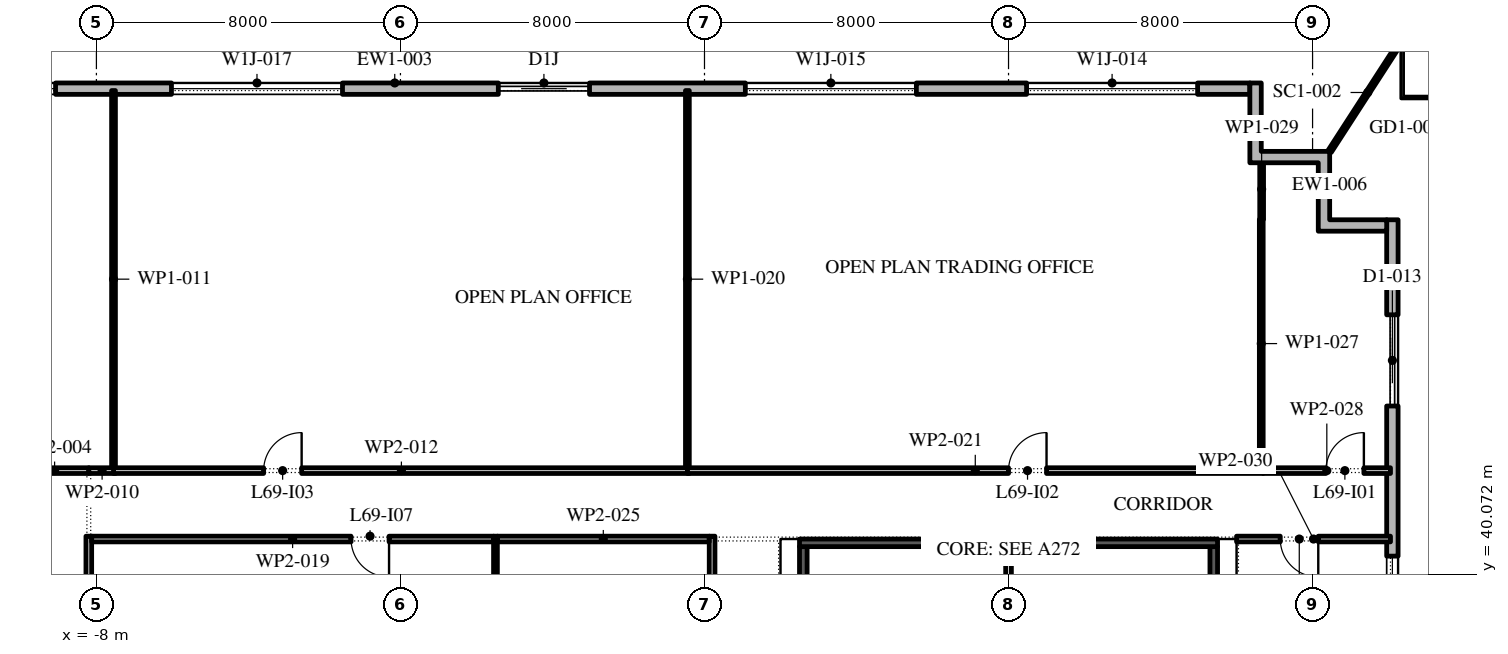
"""IFC4 building model, lengths in metres.
Left out: names, types, materials, properties, quantities, classifications, styles, units other than length and angle.
Written with IfcOpenShell. Run it as: python <this file> out.ifc"""

import sys

from ifc_helpers import new_model, si_unit, direction, frame, frame_2d, origin, place, context, subcontext, project, spatial, polyline, rectangle, outline, extrude, element, fill, save


model = new_model("IFC4")
c1 = context("Model", 3, precision=1e-05, world=origin(), true_north=direction((0.0, 1.0)))
c2 = subcontext(c1, "Body", "Model", "MODEL_VIEW")
j1 = project(units=[si_unit("LENGTHUNIT", "METRE"), si_unit("PLANEANGLEUNIT", "RADIAN")], contexts=[c1])
p1 = place(None, origin())
s1 = spatial("IfcSite", under=j1, at=p1, CompositionType="ELEMENT")
p2 = place(p1, origin())
s2 = spatial("IfcBuilding", under=s1, at=p2, CompositionType="ELEMENT")
p3 = place(p2, frame((0.0, 0.0, 317.4)))
s3 = spatial("IfcBuildingStorey", under=s2, at=p3, CompositionType="ELEMENT", Elevation=317.4)
p4 = place(p3, frame((26.1, -2.1, 0.0), z_axis=(0.0, 0.0, 1.0), x_axis=(0.0, 1.0, 0.0)))
e1 = element("IfcWall", 1, at=p4, inside=s3, PredefinedType="STANDARD", context=c2, shape_type="SweptSolid", body=[
    extrude(rectangle(XDim=51.5, YDim=0.3, at=frame_2d((25.75, 0.0))), origin(), (0.0, 0.0, 1.0), 4.0),
])
p5 = place(p4, frame((1.3, 0.0, 0.45)))
e2 = element("IfcOpeningElement", 2, at=p5, cuts=e1, PredefinedType="OPENING", context=c2, shape_type="SweptSolid", body=[
    extrude(rectangle(XDim=4.5, YDim=3.05, at=frame_2d((2.25, 1.525))), frame((0.0, 0.16, 0.0), z_axis=(0.0, -1.0, 0.0), x_axis=(1.0, 0.0, 0.0)), (0.0, 0.0, 1.0), 0.32),
])
p6 = place(p4, frame((8.55, 0.0, 0.45)))
e3 = element("IfcOpeningElement", 3, at=p6, cuts=e1, PredefinedType="OPENING", context=c2, shape_type="SweptSolid", body=[
    extrude(rectangle(XDim=4.5, YDim=3.05, at=frame_2d((2.25, 1.525))), frame((0.0, 0.16, 0.0), z_axis=(0.0, -1.0, 0.0), x_axis=(1.0, 0.0, 0.0)), (0.0, 0.0, 1.0), 0.32),
])
p7 = place(p4, frame((17.0, 0.0, 0.0)))
e4 = element("IfcOpeningElement", 4, at=p7, cuts=e1, PredefinedType="OPENING", context=c2, shape_type="SweptSolid", body=[
    extrude(rectangle(XDim=2.4, YDim=3.5, at=frame_2d((1.2, 1.75))), frame((0.0, 0.16, 0.0), z_axis=(0.0, -1.0, 0.0), x_axis=(1.0, 0.0, 0.0)), (0.0, 0.0, 1.0), 0.32),
])
p8 = place(p4, frame((23.35, 0.0, 0.45)))
e5 = element("IfcOpeningElement", 5, at=p8, cuts=e1, PredefinedType="OPENING", context=c2, shape_type="SweptSolid", body=[
    extrude(rectangle(XDim=4.5, YDim=3.05, at=frame_2d((2.25, 1.525))), frame((0.0, 0.16, 0.0), z_axis=(0.0, -1.0, 0.0), x_axis=(1.0, 0.0, 0.0)), (0.0, 0.0, 1.0), 0.32),
])
p9 = place(p4, frame((30.75, 0.0, 0.45)))
e6 = element("IfcOpeningElement", 6, at=p9, cuts=e1, PredefinedType="OPENING", context=c2, shape_type="SweptSolid", body=[
    extrude(rectangle(XDim=4.5, YDim=3.05, at=frame_2d((2.25, 1.525))), frame((0.0, 0.16, 0.0), z_axis=(0.0, -1.0, 0.0), x_axis=(1.0, 0.0, 0.0)), (0.0, 0.0, 1.0), 0.32),
])
p10 = place(p4, frame((38.15, 0.0, 0.45)))
e7 = element("IfcOpeningElement", 7, at=p10, cuts=e1, PredefinedType="OPENING", context=c2, shape_type="SweptSolid", body=[
    extrude(rectangle(XDim=4.5, YDim=3.05, at=frame_2d((2.25, 1.525))), frame((0.0, 0.16, 0.0), z_axis=(0.0, -1.0, 0.0), x_axis=(1.0, 0.0, 0.0)), (0.0, 0.0, 1.0), 0.32),
])
p11 = place(p4, frame((46.6, 0.0, 0.0)))
e8 = element("IfcOpeningElement", 8, at=p11, cuts=e1, PredefinedType="OPENING", context=c2, shape_type="SweptSolid", body=[
    extrude(rectangle(XDim=2.4, YDim=3.5, at=frame_2d((1.2, 1.75))), frame((0.0, 0.16, 0.0), z_axis=(0.0, -1.0, 0.0), x_axis=(1.0, 0.0, 0.0)), (0.0, 0.0, 1.0), 0.32),
])
p12 = place(p3, frame((22.35, 52.85, 0.0), z_axis=(0.0, 0.0, 1.0), x_axis=(-1.0, 0.0, 0.0)))
e9 = element("IfcWall", 9, at=p12, inside=s3, PredefinedType="STANDARD", context=c2, shape_type="SweptSolid", body=[
    extrude(rectangle(XDim=45.0, YDim=0.3, at=frame_2d((22.5, 0.0))), origin(), (0.0, 0.0, 1.0), 4.0),
])
p13 = place(p12, frame((1.375, 0.0, 0.45)))
e10 = element("IfcOpeningElement", 10, at=p13, cuts=e9, PredefinedType="OPENING", context=c2, shape_type="SweptSolid", body=[
    extrude(rectangle(XDim=4.5, YDim=2.675, at=frame_2d((2.25, 1.337))), frame((0.0, 0.16, 0.0), z_axis=(0.0, -1.0, 0.0), x_axis=(1.0, 0.0, 0.0)), (0.0, 0.0, 1.0), 0.32),
])
p14 = place(p12, frame((8.775, 0.0, 0.45)))
e11 = element("IfcOpeningElement", 11, at=p14, cuts=e9, PredefinedType="OPENING", context=c2, shape_type="SweptSolid", body=[
    extrude(rectangle(XDim=4.5, YDim=2.675, at=frame_2d((2.25, 1.337))), frame((0.0, 0.16, 0.0), z_axis=(0.0, -1.0, 0.0), x_axis=(1.0, 0.0, 0.0)), (0.0, 0.0, 1.0), 0.32),
])
p15 = place(p12, frame((17.375, 0.0, 0.0)))
e12 = element("IfcOpeningElement", 12, at=p15, cuts=e9, PredefinedType="OPENING", context=c2, shape_type="SweptSolid", body=[
    extrude(rectangle(XDim=2.4, YDim=3.125, at=frame_2d((1.2, 1.562))), frame((0.0, 0.16, 0.0), z_axis=(0.0, -1.0, 0.0), x_axis=(1.0, 0.0, 0.0)), (0.0, 0.0, 1.0), 0.32),
])
p16 = place(p12, frame((23.875, 0.0, 0.45)))
e13 = element("IfcOpeningElement", 13, at=p16, cuts=e9, PredefinedType="OPENING", context=c2, shape_type="SweptSolid", body=[
    extrude(rectangle(XDim=4.5, YDim=2.675, at=frame_2d((2.25, 1.337))), frame((0.0, 0.16, 0.0), z_axis=(0.0, -1.0, 0.0), x_axis=(1.0, 0.0, 0.0)), (0.0, 0.0, 1.0), 0.32),
])
p17 = place(p12, frame((31.425, 0.0, 0.45)))
e14 = element("IfcOpeningElement", 14, at=p17, cuts=e9, PredefinedType="OPENING", context=c2, shape_type="SweptSolid", body=[
    extrude(rectangle(XDim=4.5, YDim=2.675, at=frame_2d((2.25, 1.337))), frame((0.0, 0.16, 0.0), z_axis=(0.0, -1.0, 0.0), x_axis=(1.0, 0.0, 0.0)), (0.0, 0.0, 1.0), 0.32),
])
p18 = place(p12, frame((38.975, 0.0, 0.45)))
e15 = element("IfcOpeningElement", 15, at=p18, cuts=e9, PredefinedType="OPENING", context=c2, shape_type="SweptSolid", body=[
    extrude(rectangle(XDim=4.5, YDim=2.675, at=frame_2d((2.25, 1.337))), frame((0.0, 0.16, 0.0), z_axis=(0.0, -1.0, 0.0), x_axis=(1.0, 0.0, 0.0)), (0.0, 0.0, 1.0), 0.32),
])
p19 = place(p3, origin())
e16 = element("IfcWall", 16, at=p19, inside=s3, PredefinedType="STANDARD", context=c2, shape_type="SweptSolid", body=[
    extrude(outline(polyline([(24.15, 50.9), (22.35, 50.9), (22.35, 53.0), (22.65, 53.0), (22.65, 51.2), (24.45, 51.2), (24.45, 49.4), (25.95, 49.4), (25.95, 49.1), (24.15, 49.1), (24.15, 50.9)])), origin(), (0.0, 0.0, 1.0), 4.0),
])
p20 = place(p3, frame((24.45, 51.2, -0.05), z_axis=(0.0, 0.0, 1.0), x_axis=(0.543275962531, 0.839554184396, 0.0)))
e17 = element("IfcWall", 17, at=p20, inside=s3, PredefinedType="STANDARD", context=c2, shape_type="SweptSolid", body=[
    extrude(rectangle(XDim=3.691, YDim=0.1, at=frame_2d((1.845, 0.0))), origin(), (0.0, 0.0, 1.0), 4.05),
])
p21 = place(p3, frame((21.4, 25.75, 0.0), z_axis=(0.0, 0.0, 1.0), x_axis=(0.0, 1.0, 0.0)))
e18 = element("IfcWall", 18, at=p21, inside=s3, PredefinedType="SHEAR", context=c2, shape_type="SweptSolid", body=[
    extrude(rectangle(XDim=15.05, YDim=0.2, at=frame_2d((7.525, 0.0))), origin(), (0.0, 0.0, 1.0), 4.0),
])
p22 = place(p21, frame((7.075, 0.0, 0.0)))
e19 = element("IfcOpeningElement", 19, at=p22, cuts=e18, PredefinedType="OPENING", context=c2, shape_type="SweptSolid", body=[
    extrude(rectangle(XDim=0.9, YDim=2.1, at=frame_2d((0.45, 1.05))), frame((0.0, 0.11, 0.0), z_axis=(0.0, -1.0, 0.0), x_axis=(1.0, 0.0, 0.0)), (0.0, 0.0, 1.0), 0.22),
])
p23 = place(p3, frame((10.6, 25.75, 0.0), z_axis=(0.0, 0.0, 1.0), x_axis=(0.0, 1.0, 0.0)))
e20 = element("IfcWall", 20, at=p23, inside=s3, PredefinedType="SHEAR", context=c2, shape_type="SweptSolid", body=[
    extrude(rectangle(XDim=15.05, YDim=0.2, at=frame_2d((7.525, 0.0))), origin(), (0.0, 0.0, 1.0), 4.0),
])
p24 = place(p23, frame((3.288, 0.0, 0.0)))
e21 = element("IfcOpeningElement", 21, at=p24, cuts=e20, PredefinedType="OPENING", context=c2, shape_type="SweptSolid", body=[
    extrude(rectangle(XDim=0.9, YDim=2.1, at=frame_2d((0.45, 1.05))), frame((0.0, 0.11, 0.0), z_axis=(0.0, -1.0, 0.0), x_axis=(1.0, 0.0, 0.0)), (0.0, 0.0, 1.0), 0.22),
])
p25 = place(p23, frame((10.887, 0.0, 0.0)))
e22 = element("IfcOpeningElement", 22, at=p25, cuts=e20, PredefinedType="OPENING", context=c2, shape_type="SweptSolid", body=[
    extrude(rectangle(XDim=0.9, YDim=2.1, at=frame_2d((0.45, 1.05))), frame((0.0, 0.11, 0.0), z_axis=(0.0, -1.0, 0.0), x_axis=(1.0, 0.0, 0.0)), (0.0, 0.0, 1.0), 0.22),
])
p26 = place(p3, frame((10.5, 40.9, 0.0), z_axis=(0.0, 0.0, 1.0), x_axis=(1.0, 0.0, 0.0)))
e23 = element("IfcWall", 23, at=p26, inside=s3, PredefinedType="SHEAR", context=c2, shape_type="SweptSolid", body=[
    extrude(rectangle(XDim=11.0, YDim=0.2, at=frame_2d((5.5, 0.0))), origin(), (0.0, 0.0, 1.0), 4.0),
])
p27 = place(p3, frame((16.0, 25.75, 0.0), z_axis=(0.0, 0.0, 1.0), x_axis=(0.0, 1.0, 0.0)))
e24 = element("IfcWall", 24, at=p27, inside=s3, PredefinedType="PARTITIONING", context=c2, shape_type="SweptSolid", body=[
    extrude(rectangle(XDim=15.05, YDim=0.15, at=frame_2d((7.525, 0.0))), origin(), (0.0, 0.0, 1.0), 4.0),
])
p28 = place(p3, frame((-10.0, 42.8, 0.0), z_axis=(0.0, 0.0, 1.0), x_axis=(1.0, 0.0, 0.0)))
e25 = element("IfcWall", 25, at=p28, inside=s3, PredefinedType="PARTITIONING", context=c2, shape_type="SweptSolid", body=[
    extrude(rectangle(XDim=1.8, YDim=0.15, at=frame_2d((0.9, 0.0))), origin(), (0.0, 0.0, 1.0), 4.0),
])
p29 = place(p3, frame((-8.2, 41.075, 0.0), z_axis=(0.0, 0.0, 1.0), x_axis=(0.0, -1.0, 0.0)))
e26 = element("IfcWall", 26, at=p29, inside=s3, PredefinedType="PARTITIONING", context=c2, shape_type="SweptSolid", body=[
    extrude(rectangle(XDim=9.575, YDim=0.15, at=frame_2d((4.788, 0.0))), origin(), (0.0, 0.0, 1.0), 4.0),
])
p30 = place(p3, frame((-8.2, 42.8, 0.0), z_axis=(0.0, 0.0, 1.0), x_axis=(1.0, 0.0, 0.0)))
e27 = element("IfcWall", 27, at=p30, inside=s3, PredefinedType="PARTITIONING", context=c2, shape_type="SweptSolid", body=[
    extrude(rectangle(XDim=0.7, YDim=0.15, at=frame_2d((0.35, 0.0))), origin(), (0.0, 0.0, 1.0), 4.0),
])
p31 = place(p3, frame((-7.55, 42.875, 0.0), z_axis=(0.0, 0.0, 1.0), x_axis=(0.0, 1.0, 0.0)))
e28 = element("IfcWall", 28, at=p31, inside=s3, PredefinedType="PARTITIONING", context=c2, shape_type="SweptSolid", body=[
    extrude(rectangle(XDim=9.925, YDim=0.1, at=frame_2d((4.962, 0.0))), origin(), (0.0, 0.0, 1.0), 4.0),
])
p32 = place(p3, frame((-7.55, 42.8, 0.0), z_axis=(0.0, 0.0, 1.0), x_axis=(1.0, 0.0, 0.0)))
e29 = element("IfcWall", 29, at=p32, inside=s3, PredefinedType="PARTITIONING", context=c2, shape_type="SweptSolid", body=[
    extrude(rectangle(XDim=15.15, YDim=0.15, at=frame_2d((7.575, 0.0))), origin(), (0.0, 0.0, 1.0), 4.0),
])
p33 = place(p32, frame((3.95, 0.0, 0.0)))
e30 = element("IfcOpeningElement", 30, at=p33, cuts=e29, PredefinedType="OPENING", context=c2, shape_type="SweptSolid", body=[
    extrude(rectangle(XDim=1.0, YDim=2.1, at=frame_2d((0.5, 1.05))), frame((0.0, 0.085, 0.0), z_axis=(0.0, -1.0, 0.0), x_axis=(1.0, 0.0, 0.0)), (0.0, 0.0, 1.0), 0.17),
])
p34 = place(p3, frame((2.5, 31.55, 0.0), z_axis=(0.0, 0.0, 1.0), x_axis=(0.0, 1.0, 0.0)))
e31 = element("IfcWall", 31, at=p34, inside=s3, PredefinedType="PARTITIONING", context=c2, shape_type="SweptSolid", body=[
    extrude(rectangle(XDim=9.525, YDim=0.1, at=frame_2d((4.762, 0.0))), origin(), (0.0, 0.0, 1.0), 4.0),
])
p35 = place(p3, frame((2.45, 41.0, 0.0), z_axis=(0.0, 0.0, 1.0), x_axis=(-1.0, 0.0, 0.0)))
e32 = element("IfcWall", 32, at=p35, inside=s3, PredefinedType="PARTITIONING", context=c2, shape_type="SweptSolid", body=[
    extrude(rectangle(XDim=10.575, YDim=0.15, at=frame_2d((5.288, 0.0))), origin(), (0.0, 0.0, 1.0), 4.0),
])
p36 = place(p35, frame((2.75, 0.0, 0.0)))
e33 = element("IfcOpeningElement", 33, at=p36, cuts=e32, PredefinedType="OPENING", context=c2, shape_type="SweptSolid", body=[
    extrude(rectangle(XDim=1.0, YDim=2.1, at=frame_2d((0.5, 1.05))), frame((0.0, 0.085, 0.0), z_axis=(0.0, -1.0, 0.0), x_axis=(1.0, 0.0, 0.0)), (0.0, 0.0, 1.0), 0.17),
])
p37 = place(p3, frame((7.55, 42.875, 0.0), z_axis=(0.0, 0.0, 1.0), x_axis=(0.0, 1.0, 0.0)))
e34 = element("IfcWall", 34, at=p37, inside=s3, PredefinedType="PARTITIONING", context=c2, shape_type="SweptSolid", body=[
    extrude(rectangle(XDim=9.925, YDim=0.1, at=frame_2d((4.962, 0.0))), origin(), (0.0, 0.0, 1.0), 4.0),
])
p38 = place(p3, frame((7.55, 42.8, 0.0), z_axis=(0.0, 0.0, 1.0), x_axis=(1.0, 0.0, 0.0)))
e35 = element("IfcWall", 35, at=p38, inside=s3, PredefinedType="PARTITIONING", context=c2, shape_type="SweptSolid", body=[
    extrude(rectangle(XDim=15.15, YDim=0.15, at=frame_2d((7.575, 0.0))), origin(), (0.0, 0.0, 1.0), 4.0),
])
p39 = place(p38, frame((8.45, 0.0, 0.0)))
e36 = element("IfcOpeningElement", 36, at=p39, cuts=e35, PredefinedType="OPENING", context=c2, shape_type="SweptSolid", body=[
    extrude(rectangle(XDim=1.0, YDim=2.1, at=frame_2d((0.5, 1.05))), frame((0.0, 0.085, 0.0), z_axis=(0.0, -1.0, 0.0), x_axis=(1.0, 0.0, 0.0)), (0.0, 0.0, 1.0), 0.17),
])
p40 = place(p3, frame((8.2, 25.5, 0.0), z_axis=(0.0, 0.0, 1.0), x_axis=(0.0, 1.0, 0.0)))
e37 = element("IfcWall", 37, at=p40, inside=s3, PredefinedType="PARTITIONING", context=c2, shape_type="SweptSolid", body=[
    extrude(rectangle(XDim=15.575, YDim=0.15, at=frame_2d((7.788, 0.0))), origin(), (0.0, 0.0, 1.0), 4.0),
])
p41 = place(p40, frame((4.1, 0.0, 0.0)))
e38 = element("IfcOpeningElement", 38, at=p41, cuts=e37, PredefinedType="OPENING", context=c2, shape_type="SweptSolid", body=[
    extrude(rectangle(XDim=1.0, YDim=2.1, at=frame_2d((0.5, 1.05))), frame((0.0, 0.085, 0.0), z_axis=(0.0, -1.0, 0.0), x_axis=(1.0, 0.0, 0.0)), (0.0, 0.0, 1.0), 0.17),
])
p42 = place(p3, frame((8.125, 41.0, 0.0), z_axis=(0.0, 0.0, 1.0), x_axis=(-1.0, 0.0, 0.0)))
e39 = element("IfcWall", 39, at=p42, inside=s3, PredefinedType="PARTITIONING", context=c2, shape_type="SweptSolid", body=[
    extrude(rectangle(XDim=5.575, YDim=0.15, at=frame_2d((2.788, 0.0))), origin(), (0.0, 0.0, 1.0), 4.0),
])
p43 = place(p3, frame((22.65, 42.875, 0.0), z_axis=(0.0, 0.0, 1.0), x_axis=(0.0, 1.0, 0.0)))
e40 = element("IfcWall", 40, at=p43, inside=s3, PredefinedType="PARTITIONING", context=c2, shape_type="SweptSolid", body=[
    extrude(rectangle(XDim=6.535, YDim=0.1, at=frame_2d((3.268, 0.0))), origin(), (0.0, 0.0, 1.0), 4.0),
])
p44 = place(p3, frame((22.7, 42.8, 0.0), z_axis=(0.0, 0.0, 1.0), x_axis=(1.0, 0.0, 0.0)))
e41 = element("IfcWall", 41, at=p44, inside=s3, PredefinedType="PARTITIONING", context=c2, shape_type="SweptSolid", body=[
    extrude(rectangle(XDim=3.35, YDim=0.15, at=frame_2d((1.675, 0.0))), origin(), (0.0, 0.0, 1.0), 4.0),
])
p45 = place(p44, frame((1.65, 0.0, 0.0)))
e42 = element("IfcOpeningElement", 42, at=p45, cuts=e41, PredefinedType="OPENING", context=c2, shape_type="SweptSolid", body=[
    extrude(rectangle(XDim=1.0, YDim=2.1, at=frame_2d((0.5, 1.05))), frame((0.0, 0.085, 0.0), z_axis=(0.0, -1.0, 0.0), x_axis=(1.0, 0.0, 0.0)), (0.0, 0.0, 1.0), 0.17),
])
p46 = place(p3, frame((22.66, 49.41, 0.0), z_axis=(0.0, 0.0, 1.0), x_axis=(0.0, 1.0, 0.0)))
e43 = element("IfcWall", 43, at=p46, inside=s3, PredefinedType="PARTITIONING", context=c2, shape_type="SweptSolid", body=[
    extrude(rectangle(XDim=1.59, YDim=0.1, at=frame_2d((0.795, 0.0))), origin(), (0.0, 0.0, 1.0), 4.0),
])
p47 = place(p3, frame((26.05, 41.0, 0.0), z_axis=(0.0, 0.0, 1.0), x_axis=(-1.0, 0.0, 0.0)))
e44 = element("IfcWall", 44, at=p47, inside=s3, PredefinedType="PARTITIONING", context=c2, shape_type="SweptSolid", body=[
    extrude(rectangle(XDim=4.05, YDim=0.15, at=frame_2d((2.025, 0.0))), origin(), (0.0, 0.0, 1.0), 4.0),
])
p48 = place(p47, frame((1.9, 0.0, 0.0)))
e45 = element("IfcOpeningElement", 45, at=p48, cuts=e44, PredefinedType="OPENING", context=c2, shape_type="SweptSolid", body=[
    extrude(rectangle(XDim=1.0, YDim=2.1, at=frame_2d((0.5, 1.05))), frame((0.0, 0.085, 0.0), z_axis=(0.0, -1.0, 0.0), x_axis=(1.0, 0.0, 0.0)), (0.0, 0.0, 1.0), 0.17),
])
p49 = place(p10, origin())
e46 = element("IfcWindow", 46, at=p49, inside=s3, PartitioningType="DOUBLE_PANEL_VERTICAL", PredefinedType="WINDOW", context=c2, shape_type="SweptSolid", body=[
    extrude(rectangle(XDim=4.5, YDim=3.05, at=frame_2d((2.25, 1.525))), frame((0.0, 0.03, 0.0), z_axis=(0.0, -1.0, 0.0), x_axis=(1.0, 0.0, 0.0)), (0.0, 0.0, 1.0), 0.06),
])
fill(e7, e46)
p50 = place(p11, origin())
e47 = element("IfcDoor", 47, at=p50, inside=s3, OperationType="DOUBLE_DOOR_SLIDING", PredefinedType="DOOR", context=c2, shape_type="SweptSolid", body=[
    extrude(rectangle(XDim=2.4, YDim=3.5, at=frame_2d((1.2, 1.75))), frame((0.0, 0.025, 0.0), z_axis=(0.0, -1.0, 0.0), x_axis=(1.0, 0.0, 0.0)), (0.0, 0.0, 1.0), 0.05),
])
fill(e8, e47)
p51 = place(p13, origin())
e48 = element("IfcWindow", 48, at=p51, inside=s3, PartitioningType="DOUBLE_PANEL_VERTICAL", PredefinedType="WINDOW", context=c2, shape_type="SweptSolid", body=[
    extrude(rectangle(XDim=4.5, YDim=2.675, at=frame_2d((2.25, 1.337))), frame((0.0, 0.03, 0.0), z_axis=(0.0, -1.0, 0.0), x_axis=(1.0, 0.0, 0.0)), (0.0, 0.0, 1.0), 0.06),
])
fill(e10, e48)
p52 = place(p14, origin())
e49 = element("IfcWindow", 49, at=p52, inside=s3, PartitioningType="DOUBLE_PANEL_VERTICAL", PredefinedType="WINDOW", context=c2, shape_type="SweptSolid", body=[
    extrude(rectangle(XDim=4.5, YDim=2.675, at=frame_2d((2.25, 1.337))), frame((0.0, 0.03, 0.0), z_axis=(0.0, -1.0, 0.0), x_axis=(1.0, 0.0, 0.0)), (0.0, 0.0, 1.0), 0.06),
])
fill(e11, e49)
p53 = place(p15, origin())
e50 = element("IfcDoor", 50, at=p53, inside=s3, OperationType="DOUBLE_DOOR_SLIDING", PredefinedType="DOOR", context=c2, shape_type="SweptSolid", body=[
    extrude(rectangle(XDim=2.4, YDim=3.125, at=frame_2d((1.2, 1.562))), frame((0.0, 0.025, 0.0), z_axis=(0.0, -1.0, 0.0), x_axis=(1.0, 0.0, 0.0)), (0.0, 0.0, 1.0), 0.05),
])
fill(e12, e50)
p54 = place(p16, origin())
e51 = element("IfcWindow", 51, at=p54, inside=s3, PartitioningType="DOUBLE_PANEL_VERTICAL", PredefinedType="WINDOW", context=c2, shape_type="SweptSolid", body=[
    extrude(rectangle(XDim=4.5, YDim=2.675, at=frame_2d((2.25, 1.337))), frame((0.0, 0.03, 0.0), z_axis=(0.0, -1.0, 0.0), x_axis=(1.0, 0.0, 0.0)), (0.0, 0.0, 1.0), 0.06),
])
fill(e13, e51)
p55 = place(p17, origin())
e52 = element("IfcWindow", 52, at=p55, inside=s3, PartitioningType="DOUBLE_PANEL_VERTICAL", PredefinedType="WINDOW", context=c2, shape_type="SweptSolid", body=[
    extrude(rectangle(XDim=4.5, YDim=2.675, at=frame_2d((2.25, 1.337))), frame((0.0, 0.03, 0.0), z_axis=(0.0, -1.0, 0.0), x_axis=(1.0, 0.0, 0.0)), (0.0, 0.0, 1.0), 0.06),
])
fill(e14, e52)
p56 = place(p45, origin())
e53 = element("IfcDoor", 53, at=p56, inside=s3, OperationType="SINGLE_SWING_LEFT", PredefinedType="DOOR", context=c2, shape_type="SweptSolid", body=[
    extrude(rectangle(XDim=1.0, YDim=2.1, at=frame_2d((0.5, 1.05))), frame((0.0, 0.025, 0.0), z_axis=(0.0, -1.0, 0.0), x_axis=(1.0, 0.0, 0.0)), (0.0, 0.0, 1.0), 0.05),
])
fill(e42, e53)
p57 = place(p39, origin())
e54 = element("IfcDoor", 54, at=p57, inside=s3, OperationType="SINGLE_SWING_LEFT", PredefinedType="DOOR", context=c2, shape_type="SweptSolid", body=[
    extrude(rectangle(XDim=1.0, YDim=2.1, at=frame_2d((0.5, 1.05))), frame((0.0, 0.025, 0.0), z_axis=(0.0, -1.0, 0.0), x_axis=(1.0, 0.0, 0.0)), (0.0, 0.0, 1.0), 0.05),
])
fill(e36, e54)
p58 = place(p33, origin())
e55 = element("IfcDoor", 55, at=p58, inside=s3, OperationType="SINGLE_SWING_LEFT", PredefinedType="DOOR", context=c2, shape_type="SweptSolid", body=[
    extrude(rectangle(XDim=1.0, YDim=2.1, at=frame_2d((0.5, 1.05))), frame((0.0, 0.025, 0.0), z_axis=(0.0, -1.0, 0.0), x_axis=(1.0, 0.0, 0.0)), (0.0, 0.0, 1.0), 0.05),
])
fill(e30, e55)
p59 = place(p36, origin())
e56 = element("IfcDoor", 56, at=p59, inside=s3, OperationType="SINGLE_SWING_RIGHT", PredefinedType="DOOR", context=c2, shape_type="SweptSolid", body=[
    extrude(rectangle(XDim=1.0, YDim=2.1, at=frame_2d((0.5, 1.05))), frame((0.0, 0.025, 0.0), z_axis=(0.0, -1.0, 0.0), x_axis=(1.0, 0.0, 0.0)), (0.0, 0.0, 1.0), 0.05),
])
fill(e33, e56)
p60 = place(p48, origin())
e57 = element("IfcDoor", 57, at=p60, inside=s3, OperationType="SINGLE_SWING_RIGHT", PredefinedType="DOOR", context=c2, shape_type="SweptSolid", body=[
    extrude(rectangle(XDim=1.0, YDim=2.1, at=frame_2d((0.5, 1.05))), frame((0.0, 0.025, 0.0), z_axis=(0.0, -1.0, 0.0), x_axis=(1.0, 0.0, 0.0)), (0.0, 0.0, 1.0), 0.05),
])
fill(e45, e57)
save(model, sys.argv[1])
